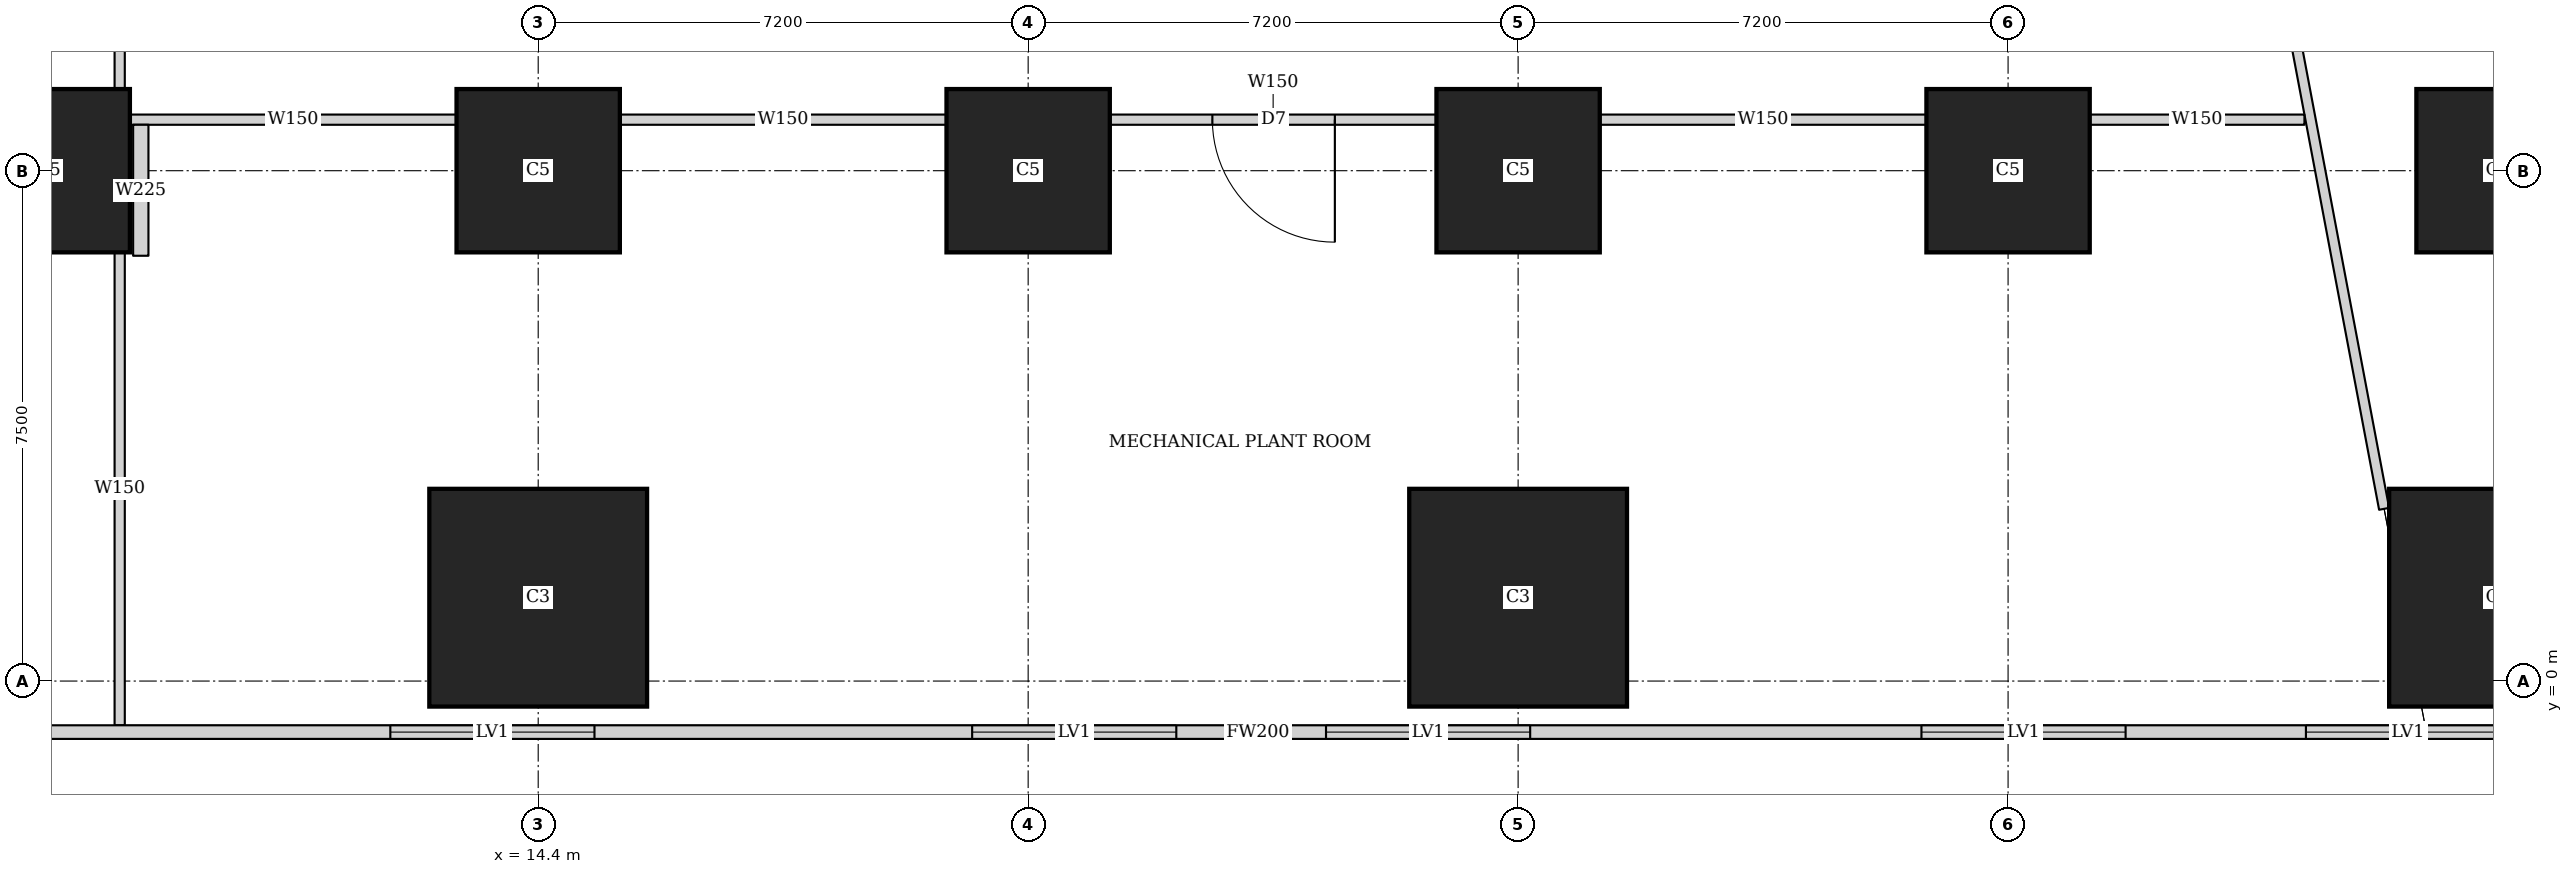
"""IFC4 building model, lengths in metres.
Left out: names, types, materials, properties, quantities, classifications, styles, units other than length and angle.
Written with IfcOpenShell. Run it as: python <this file> out.ifc"""

import sys

from ifc_helpers import new_model, si_unit, direction, frame, frame_2d, origin, origin_2d, place, context, subcontext, project, spatial, rectangle, extrude, element, fill, save


model = new_model("IFC4")
c1 = context("Model", 3, precision=1e-05, world=origin(), true_north=direction((0.0, 1.0)))
c2 = subcontext(c1, "Body", "Model", "MODEL_VIEW")
j1 = project(units=[si_unit("LENGTHUNIT", "METRE"), si_unit("PLANEANGLEUNIT", "RADIAN")], contexts=[c1])
p1 = place(None, origin())
s1 = spatial("IfcSite", under=j1, at=p1, CompositionType="ELEMENT")
p2 = place(p1, origin())
s2 = spatial("IfcBuilding", under=s1, at=p2, CompositionType="ELEMENT")
p3 = place(p2, frame((0.0, 0.0, 14.6)))
s3 = spatial("IfcBuildingStorey", under=s2, at=p3, CompositionType="ELEMENT", Elevation=14.6)
for number, where, z_axis, x_axis in (
    (1, (14.4, 1.225, 0.0), (0.0, 0.0, 1.0), (1.0, 0.0, 0.0)),
    (2, (28.8, 1.225, 0.0), (0.0, 0.0, 1.0), (1.0, 0.0, 0.0)),
    (3, (43.2, 1.225, 0.0), (0.0, 0.0, 1.0), (1.0, 0.0, 0.0)),
):
    element("IfcColumn", number, at=place(p3, frame(where, z_axis=z_axis, x_axis=x_axis)), inside=s3, PredefinedType="COLUMN", context=c2, shape_type="SweptSolid", body=[
        extrude(rectangle(XDim=3.2, YDim=3.2, at=origin_2d()), origin(), (0.0, 0.0, 1.0), 5.4),
    ])
for number, where, z_axis, x_axis in (
    (4, (7.2, 7.5, 0.0), (0.0, 0.0, 1.0), (1.0, 0.0, 0.0)),
    (5, (14.4, 7.5, 0.0), (0.0, 0.0, 1.0), (1.0, 0.0, 0.0)),
    (6, (21.6, 7.5, 0.0), (0.0, 0.0, 1.0), (1.0, 0.0, 0.0)),
    (7, (28.8, 7.5, 0.0), (0.0, 0.0, 1.0), (1.0, 0.0, 0.0)),
    (8, (36.0, 7.5, 0.0), (0.0, 0.0, 1.0), (1.0, 0.0, 0.0)),
    (9, (43.2, 7.5, 0.0), (0.0, 0.0, 1.0), (1.0, 0.0, 0.0)),
):
    element("IfcColumn", number, at=place(p3, frame(where, z_axis=z_axis, x_axis=x_axis)), inside=s3, PredefinedType="COLUMN", context=c2, shape_type="SweptSolid", body=[
        extrude(rectangle(XDim=2.4, YDim=2.4, at=origin_2d()), origin(), (0.0, 0.0, 1.0), 5.4),
    ])
p4 = place(p3, frame((2.163, -0.75, 0.0), z_axis=(0.0, 0.0, 1.0), x_axis=(1.0, 0.0, 0.0)))
e10 = element("IfcWall", 10, at=p4, inside=s3, PredefinedType="SOLIDWALL", context=c2, shape_type="SweptSolid", body=[
    extrude(rectangle(XDim=45.628, YDim=0.2, at=frame_2d((22.814, 0.0))), origin(), (0.0, 0.0, 1.0), 5.1),
])
p5 = place(p4, frame((1.064, 0.0, 0.6)))
e11 = element("IfcOpeningElement", 11, at=p5, cuts=e10, PredefinedType="OPENING", context=c2, shape_type="SweptSolid", body=[
    extrude(rectangle(XDim=3.0, YDim=2.4, at=frame_2d((1.5, 1.2))), frame((0.0, 0.11, 0.0), z_axis=(0.0, -1.0, 0.0), x_axis=(1.0, 0.0, 0.0)), (0.0, 0.0, 1.0), 0.22),
])
p6 = place(p4, frame((10.064, 0.0, 0.6)))
e12 = element("IfcOpeningElement", 12, at=p6, cuts=e10, PredefinedType="OPENING", context=c2, shape_type="SweptSolid", body=[
    extrude(rectangle(XDim=3.0, YDim=2.4, at=frame_2d((1.5, 1.2))), frame((0.0, 0.11, 0.0), z_axis=(0.0, -1.0, 0.0), x_axis=(1.0, 0.0, 0.0)), (0.0, 0.0, 1.0), 0.22),
])
p7 = place(p4, frame((18.614, 0.0, 0.6)))
e13 = element("IfcOpeningElement", 13, at=p7, cuts=e10, PredefinedType="OPENING", context=c2, shape_type="SweptSolid", body=[
    extrude(rectangle(XDim=3.0, YDim=2.4, at=frame_2d((1.5, 1.2))), frame((0.0, 0.11, 0.0), z_axis=(0.0, -1.0, 0.0), x_axis=(1.0, 0.0, 0.0)), (0.0, 0.0, 1.0), 0.22),
])
p8 = place(p4, frame((23.814, 0.0, 0.6)))
e14 = element("IfcOpeningElement", 14, at=p8, cuts=e10, PredefinedType="OPENING", context=c2, shape_type="SweptSolid", body=[
    extrude(rectangle(XDim=3.0, YDim=2.4, at=frame_2d((1.5, 1.2))), frame((0.0, 0.11, 0.0), z_axis=(0.0, -1.0, 0.0), x_axis=(1.0, 0.0, 0.0)), (0.0, 0.0, 1.0), 0.22),
])
p9 = place(p4, frame((32.564, 0.0, 0.6)))
e15 = element("IfcOpeningElement", 15, at=p9, cuts=e10, PredefinedType="OPENING", context=c2, shape_type="SweptSolid", body=[
    extrude(rectangle(XDim=3.0, YDim=2.4, at=frame_2d((1.5, 1.2))), frame((0.0, 0.11, 0.0), z_axis=(0.0, -1.0, 0.0), x_axis=(1.0, 0.0, 0.0)), (0.0, 0.0, 1.0), 0.22),
])
p10 = place(p4, frame((38.214, 0.0, 0.6)))
e16 = element("IfcOpeningElement", 16, at=p10, cuts=e10, PredefinedType="OPENING", context=c2, shape_type="SweptSolid", body=[
    extrude(rectangle(XDim=3.0, YDim=2.4, at=frame_2d((1.5, 1.2))), frame((0.0, 0.11, 0.0), z_axis=(0.0, -1.0, 0.0), x_axis=(1.0, 0.0, 0.0)), (0.0, 0.0, 1.0), 0.22),
])
p11 = place(p4, frame((41.564, 0.0, 0.6)))
e17 = element("IfcOpeningElement", 17, at=p11, cuts=e10, PredefinedType="OPENING", context=c2, shape_type="SweptSolid", body=[
    extrude(rectangle(XDim=3.0, YDim=2.4, at=frame_2d((1.5, 1.2))), frame((0.0, 0.11, 0.0), z_axis=(0.0, -1.0, 0.0), x_axis=(1.0, 0.0, 0.0)), (0.0, 0.0, 1.0), 0.22),
])
p12 = place(p3, frame((50.653, 2.703, 0.0), z_axis=(0.0, 0.0, 1.0), x_axis=(-0.185612026696, 0.982623109613, 0.0)))
e18 = element("IfcWall", 18, at=p12, inside=s3, PredefinedType="SOLIDWALL", context=c2, shape_type="SweptSolid", body=[
    extrude(rectangle(XDim=41.393, YDim=0.2, at=frame_2d((20.697, 0.0))), origin(), (0.0, 0.0, 1.0), 5.1),
])
p13 = place(p12, frame((1.197, 0.0, 0.6)))
e19 = element("IfcOpeningElement", 19, at=p13, cuts=e18, PredefinedType="OPENING", context=c2, shape_type="SweptSolid", body=[
    extrude(rectangle(XDim=3.0, YDim=2.4, at=frame_2d((1.5, 1.2))), frame((0.0, 0.11, 0.0), z_axis=(0.0, -1.0, 0.0), x_axis=(1.0, 0.0, 0.0)), (0.0, 0.0, 1.0), 0.22),
])
p14 = place(p12, frame((5.697, 0.0, 0.6)))
e20 = element("IfcOpeningElement", 20, at=p14, cuts=e18, PredefinedType="OPENING", context=c2, shape_type="SweptSolid", body=[
    extrude(rectangle(XDim=3.0, YDim=2.4, at=frame_2d((1.5, 1.2))), frame((0.0, 0.11, 0.0), z_axis=(0.0, -1.0, 0.0), x_axis=(1.0, 0.0, 0.0)), (0.0, 0.0, 1.0), 0.22),
])
p15 = place(p12, frame((10.197, 0.0, 0.6)))
e21 = element("IfcOpeningElement", 21, at=p15, cuts=e18, PredefinedType="OPENING", context=c2, shape_type="SweptSolid", body=[
    extrude(rectangle(XDim=3.0, YDim=2.4, at=frame_2d((1.5, 1.2))), frame((0.0, 0.11, 0.0), z_axis=(0.0, -1.0, 0.0), x_axis=(1.0, 0.0, 0.0)), (0.0, 0.0, 1.0), 0.22),
])
p16 = place(p12, frame((14.697, 0.0, 0.6)))
e22 = element("IfcOpeningElement", 22, at=p16, cuts=e18, PredefinedType="OPENING", context=c2, shape_type="SweptSolid", body=[
    extrude(rectangle(XDim=3.0, YDim=2.4, at=frame_2d((1.5, 1.2))), frame((0.0, 0.11, 0.0), z_axis=(0.0, -1.0, 0.0), x_axis=(1.0, 0.0, 0.0)), (0.0, 0.0, 1.0), 0.22),
])
p17 = place(p12, frame((19.197, 0.0, 0.6)))
e23 = element("IfcOpeningElement", 23, at=p17, cuts=e18, PredefinedType="OPENING", context=c2, shape_type="SweptSolid", body=[
    extrude(rectangle(XDim=3.0, YDim=2.4, at=frame_2d((1.5, 1.2))), frame((0.0, 0.11, 0.0), z_axis=(0.0, -1.0, 0.0), x_axis=(1.0, 0.0, 0.0)), (0.0, 0.0, 1.0), 0.22),
])
p18 = place(p12, frame((23.697, 0.0, 0.6)))
e24 = element("IfcOpeningElement", 24, at=p18, cuts=e18, PredefinedType="OPENING", context=c2, shape_type="SweptSolid", body=[
    extrude(rectangle(XDim=3.0, YDim=2.4, at=frame_2d((1.5, 1.2))), frame((0.0, 0.11, 0.0), z_axis=(0.0, -1.0, 0.0), x_axis=(1.0, 0.0, 0.0)), (0.0, 0.0, 1.0), 0.22),
])
p19 = place(p12, frame((28.197, 0.0, 0.6)))
e25 = element("IfcOpeningElement", 25, at=p19, cuts=e18, PredefinedType="OPENING", context=c2, shape_type="SweptSolid", body=[
    extrude(rectangle(XDim=3.0, YDim=2.4, at=frame_2d((1.5, 1.2))), frame((0.0, 0.11, 0.0), z_axis=(0.0, -1.0, 0.0), x_axis=(1.0, 0.0, 0.0)), (0.0, 0.0, 1.0), 0.22),
])
p20 = place(p12, frame((32.697, 0.0, 0.6)))
e26 = element("IfcOpeningElement", 26, at=p20, cuts=e18, PredefinedType="OPENING", context=c2, shape_type="SweptSolid", body=[
    extrude(rectangle(XDim=3.0, YDim=2.4, at=frame_2d((1.5, 1.2))), frame((0.0, 0.11, 0.0), z_axis=(0.0, -1.0, 0.0), x_axis=(1.0, 0.0, 0.0)), (0.0, 0.0, 1.0), 0.22),
])
p21 = place(p12, frame((37.197, 0.0, 0.6)))
e27 = element("IfcOpeningElement", 27, at=p21, cuts=e18, PredefinedType="OPENING", context=c2, shape_type="SweptSolid", body=[
    extrude(rectangle(XDim=3.0, YDim=2.4, at=frame_2d((1.5, 1.2))), frame((0.0, 0.11, 0.0), z_axis=(0.0, -1.0, 0.0), x_axis=(1.0, 0.0, 0.0)), (0.0, 0.0, 1.0), 0.22),
])
p22 = place(p3, frame((8.25, -0.65, 0.0), z_axis=(0.0, 0.0, 1.0), x_axis=(0.0, 1.0, 0.0)))
e28 = element("IfcWall", 28, at=p22, inside=s3, PredefinedType="SOLIDWALL", context=c2, shape_type="SweptSolid", body=[
    extrude(rectangle(XDim=6.949, YDim=0.15, at=frame_2d((3.475, 0.0))), origin(), (0.0, 0.0, 1.0), 5.1),
])
p23 = place(p3, frame((8.25, 8.701, 0.0), z_axis=(0.0, 0.0, 1.0), x_axis=(0.0, 1.0, 0.0)))
e29 = element("IfcWall", 29, at=p23, inside=s3, PredefinedType="SOLIDWALL", context=c2, shape_type="SweptSolid", body=[
    extrude(rectangle(XDim=5.098, YDim=0.15, at=frame_2d((2.549, 0.0))), origin(), (0.0, 0.0, 1.0), 5.1),
])
p24 = place(p3, frame((40.355, 8.25, 0.0), z_axis=(0.0, 0.0, 1.0), x_axis=(-1.0, 0.0, 0.0)))
e30 = element("IfcWall", 30, at=p24, inside=s3, PredefinedType="SOLIDWALL", context=c2, shape_type="SweptSolid", body=[
    extrude(rectangle(XDim=3.154, YDim=0.15, at=frame_2d((1.577, 0.0))), origin(), (0.0, 0.0, 1.0), 3.5),
])
p25 = place(p3, frame((34.799, 8.25, 0.0), z_axis=(0.0, 0.0, 1.0), x_axis=(-1.0, 0.0, 0.0)))
e31 = element("IfcWall", 31, at=p25, inside=s3, PredefinedType="SOLIDWALL", context=c2, shape_type="SweptSolid", body=[
    extrude(rectangle(XDim=4.798, YDim=0.15, at=frame_2d((2.399, 0.0))), origin(), (0.0, 0.0, 1.0), 3.5),
])
p26 = place(p3, frame((27.599, 8.25, 0.0), z_axis=(0.0, 0.0, 1.0), x_axis=(-1.0, 0.0, 0.0)))
e32 = element("IfcWall", 32, at=p26, inside=s3, PredefinedType="SOLIDWALL", context=c2, shape_type="SweptSolid", body=[
    extrude(rectangle(XDim=4.798, YDim=0.15, at=frame_2d((2.399, 0.0))), origin(), (0.0, 0.0, 1.0), 3.5),
])
p27 = place(p26, frame((1.492, 0.0, 0.0)))
e33 = element("IfcOpeningElement", 33, at=p27, cuts=e32, PredefinedType="OPENING", context=c2, shape_type="SweptSolid", body=[
    extrude(rectangle(XDim=1.8, YDim=2.4, at=frame_2d((0.9, 1.2))), frame((0.0, 0.085, 0.0), z_axis=(0.0, -1.0, 0.0), x_axis=(1.0, 0.0, 0.0)), (0.0, 0.0, 1.0), 0.17),
])
p28 = place(p3, frame((20.399, 8.25, 0.0), z_axis=(0.0, 0.0, 1.0), x_axis=(-1.0, 0.0, 0.0)))
e34 = element("IfcWall", 34, at=p28, inside=s3, PredefinedType="SOLIDWALL", context=c2, shape_type="SweptSolid", body=[
    extrude(rectangle(XDim=4.798, YDim=0.15, at=frame_2d((2.399, 0.0))), origin(), (0.0, 0.0, 1.0), 3.5),
])
p29 = place(p3, frame((13.199, 8.25, 0.0), z_axis=(0.0, 0.0, 1.0), x_axis=(-1.0, 0.0, 0.0)))
e35 = element("IfcWall", 35, at=p29, inside=s3, PredefinedType="SOLIDWALL", context=c2, shape_type="SweptSolid", body=[
    extrude(rectangle(XDim=4.798, YDim=0.15, at=frame_2d((2.399, 0.0))), origin(), (0.0, 0.0, 1.0), 3.5),
])
p30 = place(p3, frame((35.15, 36.285, 0.0), z_axis=(0.0, 0.0, 1.0), x_axis=(0.185613484682, -0.982622834207, 0.0)))
e36 = element("IfcWall", 36, at=p30, inside=s3, PredefinedType="SOLIDWALL", context=c2, shape_type="SweptSolid", body=[
    extrude(rectangle(XDim=34.351, YDim=0.15, at=frame_2d((17.175, 0.0))), origin(), (0.0, 0.0, 1.0), 3.5),
])
p31 = place(p30, frame((13.652, 0.0, 0.0)))
e37 = element("IfcOpeningElement", 37, at=p31, cuts=e36, PredefinedType="OPENING", context=c2, shape_type="SweptSolid", body=[
    extrude(rectangle(XDim=1.8, YDim=2.4, at=frame_2d((0.9, 1.2))), frame((0.0, 0.085, 0.0), z_axis=(0.0, -1.0, 0.0), x_axis=(1.0, 0.0, 0.0)), (0.0, 0.0, 1.0), 0.17),
])
p32 = place(p3, frame((8.56, 6.25, 0.0), z_axis=(0.0, 0.0, 1.0), x_axis=(0.0, 1.0, 0.0)))
e38 = element("IfcWall", 38, at=p32, inside=s3, PredefinedType="SOLIDWALL", context=c2, shape_type="SweptSolid", body=[
    extrude(rectangle(XDim=1.925, YDim=0.225, at=frame_2d((0.962, 0.0))), origin(), (0.0, 0.0, 1.0), 3.5),
])
p33 = place(p6, origin())
e39 = element("IfcWindow", 39, at=p33, inside=s3, PartitioningType="SINGLE_PANEL", PredefinedType="USERDEFINED", context=c2, shape_type="SweptSolid", body=[
    extrude(rectangle(XDim=3.0, YDim=2.4, at=frame_2d((1.5, 1.2))), frame((0.0, 0.03, 0.0), z_axis=(0.0, -1.0, 0.0), x_axis=(1.0, 0.0, 0.0)), (0.0, 0.0, 1.0), 0.06),
])
fill(e12, e39)
p34 = place(p7, origin())
e40 = element("IfcWindow", 40, at=p34, inside=s3, PartitioningType="SINGLE_PANEL", PredefinedType="USERDEFINED", context=c2, shape_type="SweptSolid", body=[
    extrude(rectangle(XDim=3.0, YDim=2.4, at=frame_2d((1.5, 1.2))), frame((0.0, 0.03, 0.0), z_axis=(0.0, -1.0, 0.0), x_axis=(1.0, 0.0, 0.0)), (0.0, 0.0, 1.0), 0.06),
])
fill(e13, e40)
p35 = place(p8, origin())
e41 = element("IfcWindow", 41, at=p35, inside=s3, PartitioningType="SINGLE_PANEL", PredefinedType="USERDEFINED", context=c2, shape_type="SweptSolid", body=[
    extrude(rectangle(XDim=3.0, YDim=2.4, at=frame_2d((1.5, 1.2))), frame((0.0, 0.03, 0.0), z_axis=(0.0, -1.0, 0.0), x_axis=(1.0, 0.0, 0.0)), (0.0, 0.0, 1.0), 0.06),
])
fill(e14, e41)
p36 = place(p9, origin())
e42 = element("IfcWindow", 42, at=p36, inside=s3, PartitioningType="SINGLE_PANEL", PredefinedType="USERDEFINED", context=c2, shape_type="SweptSolid", body=[
    extrude(rectangle(XDim=3.0, YDim=2.4, at=frame_2d((1.5, 1.2))), frame((0.0, 0.03, 0.0), z_axis=(0.0, -1.0, 0.0), x_axis=(1.0, 0.0, 0.0)), (0.0, 0.0, 1.0), 0.06),
])
fill(e15, e42)
p37 = place(p10, origin())
e43 = element("IfcWindow", 43, at=p37, inside=s3, PartitioningType="SINGLE_PANEL", PredefinedType="USERDEFINED", context=c2, shape_type="SweptSolid", body=[
    extrude(rectangle(XDim=3.0, YDim=2.4, at=frame_2d((1.5, 1.2))), frame((0.0, 0.03, 0.0), z_axis=(0.0, -1.0, 0.0), x_axis=(1.0, 0.0, 0.0)), (0.0, 0.0, 1.0), 0.06),
])
fill(e16, e43)
p38 = place(p27, origin())
e44 = element("IfcDoor", 44, at=p38, inside=s3, OperationType="DOUBLE_DOOR_SINGLE_SWING", PredefinedType="DOOR", context=c2, shape_type="SweptSolid", body=[
    extrude(rectangle(XDim=1.8, YDim=2.4, at=frame_2d((0.9, 1.2))), frame((0.0, 0.025, 0.0), z_axis=(0.0, -1.0, 0.0), x_axis=(1.0, 0.0, 0.0)), (0.0, 0.0, 1.0), 0.05),
])
fill(e33, e44)
save(model, sys.argv[1])
